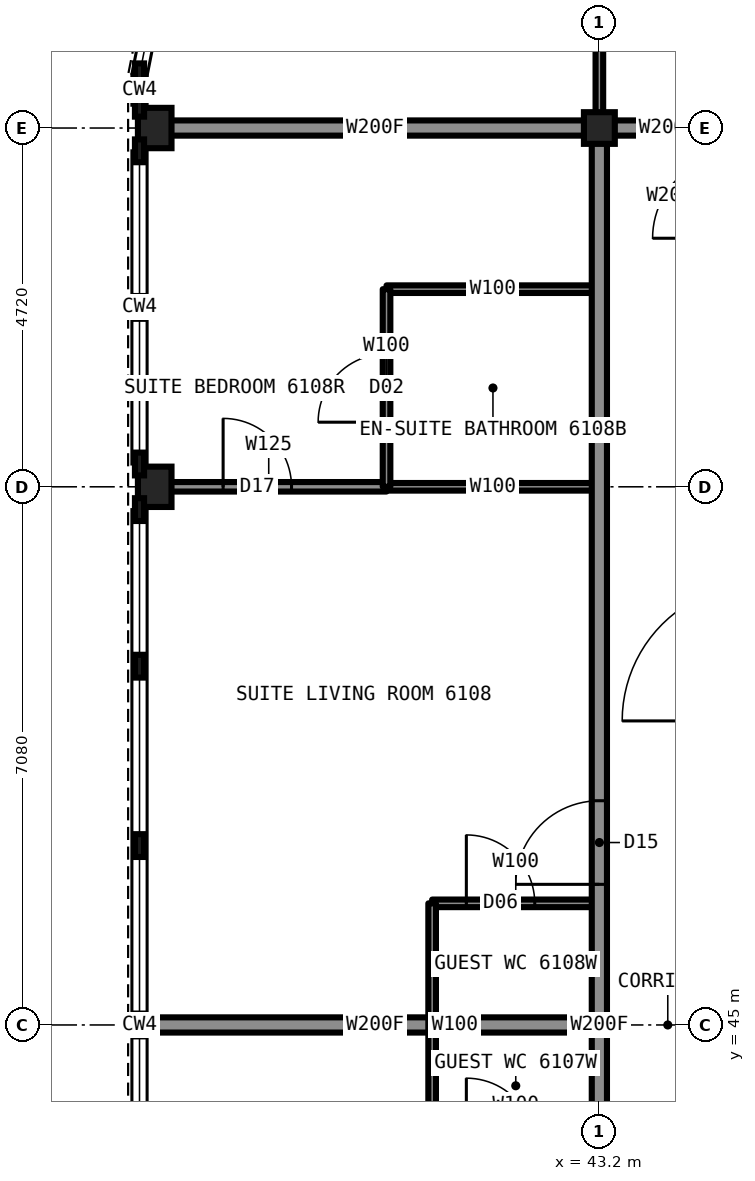
"""IFC4 building model, lengths in metres.
Left out: names, types, materials, properties, quantities, classifications, styles, units other than length and angle.
Written with IfcOpenShell. Run it as: python <this file> out.ifc"""

import sys

from ifc_helpers import new_model, si_unit, direction, frame, frame_2d, origin, origin_2d, place, context, subcontext, project, spatial, rectangle, i_section, extrude, element, fill, save


model = new_model("IFC4")
c1 = context("Model", 3, precision=1e-05, world=origin(), true_north=direction((0.0, 1.0)))
c2 = subcontext(c1, "Body", "Model", "MODEL_VIEW")
j1 = project(units=[si_unit("LENGTHUNIT", "METRE"), si_unit("PLANEANGLEUNIT", "RADIAN")], contexts=[c1])
p1 = place(None, origin())
s1 = spatial("IfcSite", under=j1, at=p1, CompositionType="ELEMENT")
p2 = place(p1, origin())
s2 = spatial("IfcBuilding", under=s1, at=p2, CompositionType="ELEMENT")
p3 = place(p2, frame((0.0, 0.0, 226.7)))
s3 = spatial("IfcBuildingStorey", under=s2, at=p3, CompositionType="ELEMENT", Elevation=226.7)
for number, where, z_axis, x_axis in (
    (1, (37.35, 52.08, 0.0), (0.0, 0.0, 1.0), (1.0, 0.0, 0.0)),
    (2, (37.35, 56.8, 0.0), (0.0, 0.0, 1.0), (1.0, 0.0, 0.0)),
):
    element("IfcColumn", number, at=place(p3, frame(where, z_axis=z_axis, x_axis=x_axis)), inside=s3, PredefinedType="COLUMN", context=c2, shape_type="SweptSolid", body=[
        extrude(i_section(OverallWidth=0.442, OverallDepth=0.531, WebThickness=0.066, FlangeThickness=0.106, at=origin_2d()), origin(), (0.0, 0.0, 1.0), 3.5),
    ])
p4 = place(p3, frame((43.2, 56.8, 0.0), z_axis=(0.0, 0.0, 1.0), x_axis=(1.0, 0.0, 0.0)))
e3 = element("IfcColumn", 3, at=p4, inside=s3, PredefinedType="COLUMN", context=c2, shape_type="SweptSolid", body=[
    extrude(i_section(OverallWidth=0.406, OverallDepth=0.417, WebThickness=0.03, FlangeThickness=0.048, at=origin_2d()), origin(), (0.0, 0.0, 1.0), 3.5),
])
p5 = place(p3, frame((37.3, 45.0, 0.0), z_axis=(0.0, 0.0, 1.0), x_axis=(1.0, 0.0, 0.0)))
e4 = element("IfcWall", 4, at=p5, inside=s3, PredefinedType="PARTITIONING", context=c2, shape_type="SweptSolid", body=[
    extrude(rectangle(XDim=5.9, YDim=0.2, at=frame_2d((2.95, 0.0))), origin(), (0.0, 0.0, 1.0), 2.797),
])
p6 = place(p3, frame((41.0, 46.6, 0.0), z_axis=(0.0, 0.0, 1.0), x_axis=(1.0, 0.0, 0.0)))
e5 = element("IfcWall", 5, at=p6, inside=s3, PredefinedType="PARTITIONING", context=c2, shape_type="SweptSolid", body=[
    extrude(rectangle(XDim=2.2, YDim=0.1, at=frame_2d((1.1, 0.0))), origin(), (0.0, 0.0, 1.0), 3.33),
])
p7 = place(p6, frame((0.45, 0.0, 0.0)))
e6 = element("IfcOpeningElement", 6, at=p7, cuts=e5, PredefinedType="OPENING", context=c2, shape_type="SweptSolid", body=[
    extrude(rectangle(XDim=0.9, YDim=2.1, at=frame_2d((0.45, 1.05))), frame((0.0, 0.06, 0.0), z_axis=(0.0, -1.0, 0.0), x_axis=(1.0, 0.0, 0.0)), (0.0, 0.0, 1.0), 0.12),
])
p8 = place(p3, frame((43.2, 56.8, 0.0), z_axis=(0.0, 0.0, 1.0), x_axis=(1.0, 0.0, 0.0)))
e7 = element("IfcWall", 7, at=p8, inside=s3, PredefinedType="PARTITIONING", context=c2, shape_type="SweptSolid", body=[
    extrude(rectangle(XDim=1.8, YDim=0.2, at=frame_2d((0.9, 0.0))), origin(), (0.0, 0.0, 1.0), 3.33),
])
p9 = place(p3, frame((37.3, 56.8, 0.0), z_axis=(0.0, 0.0, 1.0), x_axis=(1.0, 0.0, 0.0)))
e8 = element("IfcWall", 8, at=p9, inside=s3, PredefinedType="PARTITIONING", context=c2, shape_type="SweptSolid", body=[
    extrude(rectangle(XDim=5.9, YDim=0.2, at=frame_2d((2.95, 0.0))), origin(), (0.0, 0.0, 1.0), 2.573),
])
p10 = place(p3, frame((40.4, 52.08, 0.0), z_axis=(0.0, 0.0, 1.0), x_axis=(1.0, 0.0, 0.0)))
e9 = element("IfcWall", 9, at=p10, inside=s3, PredefinedType="PARTITIONING", context=c2, shape_type="SweptSolid", body=[
    extrude(rectangle(XDim=2.8, YDim=0.1, at=frame_2d((1.4, 0.0))), origin(), (0.0, 0.0, 1.0), 2.573),
])
p11 = place(p3, frame((37.3, 52.08, 0.0), z_axis=(0.0, 0.0, 1.0), x_axis=(1.0, 0.0, 0.0)))
e10 = element("IfcWall", 10, at=p11, inside=s3, PredefinedType="PARTITIONING", context=c2, shape_type="SweptSolid", body=[
    extrude(rectangle(XDim=3.1, YDim=0.125, at=frame_2d((1.55, 0.0))), origin(), (0.0, 0.0, 1.0), 2.573),
])
p12 = place(p11, frame((0.95, 0.0, 0.0)))
e11 = element("IfcOpeningElement", 11, at=p12, cuts=e10, PredefinedType="OPENING", context=c2, shape_type="SweptSolid", body=[
    extrude(rectangle(XDim=0.9, YDim=2.2, at=frame_2d((0.45, 1.1))), frame((0.0, 0.073, 0.0), z_axis=(0.0, -1.0, 0.0), x_axis=(1.0, 0.0, 0.0)), (0.0, 0.0, 1.0), 0.145),
])
p13 = place(p3, frame((40.4, 54.68, 0.0), z_axis=(0.0, 0.0, 1.0), x_axis=(1.0, 0.0, 0.0)))
e12 = element("IfcWall", 12, at=p13, inside=s3, PredefinedType="PARTITIONING", context=c2, shape_type="SweptSolid", body=[
    extrude(rectangle(XDim=2.8, YDim=0.1, at=frame_2d((1.4, 0.0))), origin(), (0.0, 0.0, 1.0), 3.33),
])
p14 = place(p3, frame((43.2, 56.8, 0.0), z_axis=(0.0, 0.0, 1.0), x_axis=(0.0, 1.0, 0.0)))
e13 = element("IfcWall", 13, at=p14, inside=s3, PredefinedType="PARTITIONING", context=c2, shape_type="SweptSolid", body=[
    extrude(rectangle(XDim=2.8, YDim=0.1, at=frame_2d((1.4, 0.0))), origin(), (0.0, 0.0, 1.0), 2.573),
])
p15 = place(p3, frame((43.2, 33.2, 0.0), z_axis=(0.0, 0.0, 1.0), x_axis=(0.0, 1.0, 0.0)))
e14 = element("IfcWall", 14, at=p15, inside=s3, PredefinedType="PARTITIONING", context=c2, shape_type="SweptSolid", body=[
    extrude(rectangle(XDim=23.6, YDim=0.2, at=frame_2d((11.8, 0.0))), origin(), (0.0, 0.0, 1.0), 3.33),
])
p16 = place(p15, frame((8.85, 0.0, 0.0)))
e15 = element("IfcOpeningElement", 15, at=p16, cuts=e14, PredefinedType="OPENING", context=c2, shape_type="SweptSolid", body=[
    extrude(rectangle(XDim=1.1, YDim=2.2, at=frame_2d((0.55, 1.1))), frame((0.0, 0.11, 0.0), z_axis=(0.0, -1.0, 0.0), x_axis=(1.0, 0.0, 0.0)), (0.0, 0.0, 1.0), 0.22),
])
p17 = place(p15, frame((13.65, 0.0, 0.0)))
e16 = element("IfcOpeningElement", 16, at=p17, cuts=e14, PredefinedType="OPENING", context=c2, shape_type="SweptSolid", body=[
    extrude(rectangle(XDim=1.1, YDim=2.2, at=frame_2d((0.55, 1.1))), frame((0.0, 0.11, 0.0), z_axis=(0.0, -1.0, 0.0), x_axis=(1.0, 0.0, 0.0)), (0.0, 0.0, 1.0), 0.22),
])
p18 = place(p3, frame((41.0, 43.4, 0.0), z_axis=(0.0, 0.0, 1.0), x_axis=(0.0, 1.0, 0.0)))
e17 = element("IfcWall", 17, at=p18, inside=s3, PredefinedType="PARTITIONING", context=c2, shape_type="SweptSolid", body=[
    extrude(rectangle(XDim=3.2, YDim=0.1, at=frame_2d((1.6, 0.0))), origin(), (0.0, 0.0, 1.0), 3.33),
])
p19 = place(p3, frame((40.4, 52.08, 0.0), z_axis=(0.0, 0.0, 1.0), x_axis=(0.0, 1.0, 0.0)))
e18 = element("IfcWall", 18, at=p19, inside=s3, PredefinedType="PARTITIONING", context=c2, shape_type="SweptSolid", body=[
    extrude(rectangle(XDim=2.6, YDim=0.1, at=frame_2d((1.3, 0.0))), origin(), (0.0, 0.0, 1.0), 3.33),
])
p20 = place(p19, frame((0.85, 0.0, 0.0)))
e19 = element("IfcOpeningElement", 19, at=p20, cuts=e18, PredefinedType="OPENING", context=c2, shape_type="SweptSolid", body=[
    extrude(rectangle(XDim=0.9, YDim=2.1, at=frame_2d((0.45, 1.05))), frame((0.0, 0.06, 0.0), z_axis=(0.0, -1.0, 0.0), x_axis=(1.0, 0.0, 0.0)), (0.0, 0.0, 1.0), 0.12),
])
p21 = place(p17, origin())
e20 = element("IfcDoor", 20, at=p21, inside=s3, OperationType="SINGLE_SWING_LEFT", PredefinedType="DOOR", context=c2, shape_type="SweptSolid", body=[
    extrude(rectangle(XDim=1.1, YDim=2.2, at=frame_2d((0.55, 1.1))), frame((0.0, 0.025, 0.0), z_axis=(0.0, -1.0, 0.0), x_axis=(1.0, 0.0, 0.0)), (0.0, 0.0, 1.0), 0.05),
])
fill(e16, e20)
p22 = place(p20, origin())
e21 = element("IfcDoor", 21, at=p22, inside=s3, OperationType="SINGLE_SWING_RIGHT", PredefinedType="DOOR", context=c2, shape_type="SweptSolid", body=[
    extrude(rectangle(XDim=0.9, YDim=2.1, at=frame_2d((0.45, 1.05))), frame((0.0, 0.025, 0.0), z_axis=(0.0, -1.0, 0.0), x_axis=(1.0, 0.0, 0.0)), (0.0, 0.0, 1.0), 0.05),
])
fill(e19, e21)
p23 = place(p12, origin())
e22 = element("IfcDoor", 22, at=p23, inside=s3, OperationType="SINGLE_SWING_LEFT", PredefinedType="DOOR", context=c2, shape_type="SweptSolid", body=[
    extrude(rectangle(XDim=0.9, YDim=2.2, at=frame_2d((0.45, 1.1))), frame((0.0, 0.025, 0.0), z_axis=(0.0, -1.0, 0.0), x_axis=(1.0, 0.0, 0.0)), (0.0, 0.0, 1.0), 0.05),
])
fill(e11, e22)
p24 = place(p7, origin())
e23 = element("IfcDoor", 23, at=p24, inside=s3, OperationType="SINGLE_SWING_LEFT", PredefinedType="DOOR", context=c2, shape_type="SweptSolid", body=[
    extrude(rectangle(XDim=0.9, YDim=2.1, at=frame_2d((0.45, 1.05))), frame((0.0, 0.025, 0.0), z_axis=(0.0, -1.0, 0.0), x_axis=(1.0, 0.0, 0.0)), (0.0, 0.0, 1.0), 0.05),
])
fill(e6, e23)
save(model, sys.argv[1])
